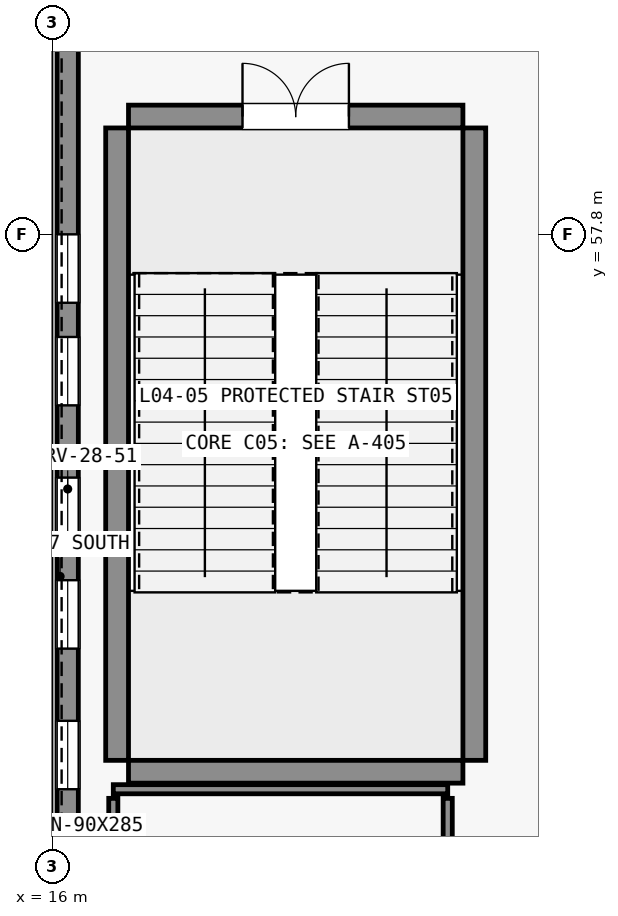
"""IFC4 building model, lengths in metres.
Left out: names, types, materials, properties, quantities, classifications, styles, units other than length and angle.
Written with IfcOpenShell. Run it as: python <this file> out.ifc"""

import sys

from ifc_helpers import new_model, si_unit, direction, frame, frame_2d, origin, place, context, subcontext, project, spatial, rectangle, extrude, element, fill, save


model = new_model("IFC4")
c1 = context("Model", 3, precision=1e-05, world=origin(), true_north=direction((0.0, 1.0)))
c2 = subcontext(c1, "Body", "Model", "MODEL_VIEW")
j1 = project(units=[si_unit("LENGTHUNIT", "METRE"), si_unit("PLANEANGLEUNIT", "RADIAN")], contexts=[c1])
p1 = place(None, origin())
s1 = spatial("IfcSite", under=j1, at=p1, CompositionType="ELEMENT")
p2 = place(p1, origin())
s2 = spatial("IfcBuilding", under=s1, at=p2, CompositionType="ELEMENT")
p3 = place(p2, frame((0.0, 0.0, 21.0)))
s3 = spatial("IfcBuildingStorey", under=s2, at=p3, CompositionType="ELEMENT", Elevation=21.0)
p4 = place(p3, frame((17.0, 50.73, 0.0), z_axis=(0.0, 0.0, 1.0), x_axis=(1.0, 0.0, 0.0)))
e1 = element("IfcWall", 1, at=p4, inside=s3, PredefinedType="SHEAR", context=c2, shape_type="SweptSolid", body=[
    extrude(rectangle(XDim=4.4, YDim=0.3, at=frame_2d((2.2, 0.0))), origin(), (0.0, 0.0, 1.0), 5.4),
])
p5 = place(p3, frame((17.0, 59.35, 0.0), z_axis=(0.0, 0.0, 1.0), x_axis=(1.0, 0.0, 0.0)))
e2 = element("IfcWall", 2, at=p5, inside=s3, PredefinedType="SHEAR", context=c2, shape_type="SweptSolid", body=[
    extrude(rectangle(XDim=4.4, YDim=0.3, at=frame_2d((2.2, 0.0))), origin(), (0.0, 0.0, 1.0), 5.4),
])
p6 = place(p5, frame((1.5, 0.0, 0.0)))
e3 = element("IfcOpeningElement", 3, at=p6, cuts=e2, PredefinedType="OPENING", context=c2, shape_type="SweptSolid", body=[
    extrude(rectangle(XDim=1.4, YDim=2.2, at=frame_2d((0.7, 1.1))), frame((0.0, 0.16, 0.0), z_axis=(0.0, -1.0, 0.0), x_axis=(1.0, 0.0, 0.0)), (0.0, 0.0, 1.0), 0.32),
])
for number, where, z_axis, x_axis in (
    (4, (16.85, 50.88, 0.0), (0.0, 0.0, 1.0), (0.0, 1.0, 0.0)),
    (5, (21.55, 50.88, 0.0), (0.0, 0.0, 1.0), (0.0, 1.0, 0.0)),
):
    element("IfcWall", number, at=place(p3, frame(where, z_axis=z_axis, x_axis=x_axis)), inside=s3, PredefinedType="SHEAR", context=c2, shape_type="SweptSolid", body=[
        extrude(rectangle(XDim=8.32, YDim=0.3, at=frame_2d((4.16, 0.0))), origin(), (0.0, 0.0, 1.0), 5.4),
    ])
p7 = place(p3, frame((16.2, 48.05, 0.0), z_axis=(0.0, 0.0, 1.0), x_axis=(0.0, 1.0, 0.0)))
e6 = element("IfcWall", 6, at=p7, inside=s3, PredefinedType="STANDARD", context=c2, shape_type="SweptSolid", body=[
    extrude(rectangle(XDim=12.8, YDim=0.28, at=frame_2d((6.4, 0.0))), origin(), (0.0, 0.0, 1.0), 5.06),
])
p8 = place(p7, frame((1.1, 0.0, 0.95)))
e7 = element("IfcOpeningElement", 7, at=p8, cuts=e6, PredefinedType="OPENING", context=c2, shape_type="SweptSolid", body=[
    extrude(rectangle(XDim=0.9, YDim=2.85, at=frame_2d((0.45, 1.425))), frame((0.0, 0.15, 0.0), z_axis=(0.0, -1.0, 0.0), x_axis=(1.0, 0.0, 0.0)), (0.0, 0.0, 1.0), 0.3),
])
p9 = place(p7, frame((2.45, 0.0, 0.95)))
e8 = element("IfcOpeningElement", 8, at=p9, cuts=e6, PredefinedType="OPENING", context=c2, shape_type="SweptSolid", body=[
    extrude(rectangle(XDim=0.9, YDim=2.85, at=frame_2d((0.45, 1.425))), frame((0.0, 0.15, 0.0), z_axis=(0.0, -1.0, 0.0), x_axis=(1.0, 0.0, 0.0)), (0.0, 0.0, 1.0), 0.3),
])
p10 = place(p7, frame((4.3, 0.0, 0.95)))
e9 = element("IfcOpeningElement", 9, at=p10, cuts=e6, PredefinedType="OPENING", context=c2, shape_type="SweptSolid", body=[
    extrude(rectangle(XDim=0.9, YDim=2.85, at=frame_2d((0.45, 1.425))), frame((0.0, 0.15, 0.0), z_axis=(0.0, -1.0, 0.0), x_axis=(1.0, 0.0, 0.0)), (0.0, 0.0, 1.0), 0.3),
])
p11 = place(p7, frame((5.65, 0.0, 0.95)))
e10 = element("IfcOpeningElement", 10, at=p11, cuts=e6, PredefinedType="OPENING", context=c2, shape_type="SweptSolid", body=[
    extrude(rectangle(XDim=0.9, YDim=2.85, at=frame_2d((0.45, 1.425))), frame((0.0, 0.15, 0.0), z_axis=(0.0, -1.0, 0.0), x_axis=(1.0, 0.0, 0.0)), (0.0, 0.0, 1.0), 0.3),
])
p12 = place(p7, frame((7.5, 0.0, 0.95)))
e11 = element("IfcOpeningElement", 11, at=p12, cuts=e6, PredefinedType="OPENING", context=c2, shape_type="SweptSolid", body=[
    extrude(rectangle(XDim=0.9, YDim=2.85, at=frame_2d((0.45, 1.425))), frame((0.0, 0.15, 0.0), z_axis=(0.0, -1.0, 0.0), x_axis=(1.0, 0.0, 0.0)), (0.0, 0.0, 1.0), 0.3),
])
p13 = place(p7, frame((8.85, 0.0, 0.95)))
e12 = element("IfcOpeningElement", 12, at=p13, cuts=e6, PredefinedType="OPENING", context=c2, shape_type="SweptSolid", body=[
    extrude(rectangle(XDim=0.9, YDim=2.85, at=frame_2d((0.45, 1.425))), frame((0.0, 0.15, 0.0), z_axis=(0.0, -1.0, 0.0), x_axis=(1.0, 0.0, 0.0)), (0.0, 0.0, 1.0), 0.3),
])
p14 = place(p3, frame((16.8, 50.5, 0.0), z_axis=(0.0, 0.0, 1.0), x_axis=(1.0, 0.0, 0.0)))
e13 = element("IfcWall", 13, at=p14, inside=s3, PredefinedType="PARTITIONING", context=c2, shape_type="SweptSolid", body=[
    extrude(rectangle(XDim=4.4, YDim=0.12, at=frame_2d((2.2, 0.0))), origin(), (0.0, 0.0, 1.0), 5.06),
])
p15 = place(p3, frame((16.8, 42.62, 0.0), z_axis=(0.0, 0.0, 1.0), x_axis=(0.0, 1.0, 0.0)))
e14 = element("IfcWall", 14, at=p15, inside=s3, PredefinedType="PARTITIONING", context=c2, shape_type="SweptSolid", body=[
    extrude(rectangle(XDim=7.76, YDim=0.12, at=frame_2d((3.88, 0.0))), origin(), (0.0, 0.0, 1.0), 5.06),
])
p16 = place(p3, frame((21.2, 42.62, 0.0), z_axis=(0.0, 0.0, 1.0), x_axis=(0.0, 1.0, 0.0)))
e15 = element("IfcWall", 15, at=p16, inside=s3, PredefinedType="PARTITIONING", context=c2, shape_type="SweptSolid", body=[
    extrude(rectangle(XDim=7.76, YDim=0.12, at=frame_2d((3.88, 0.0))), origin(), (0.0, 0.0, 1.0), 5.06),
])
p17 = place(p16, frame((3.33, 0.0, 0.0)))
e16 = element("IfcOpeningElement", 16, at=p17, cuts=e15, PredefinedType="OPENING", context=c2, shape_type="SweptSolid", body=[
    extrude(rectangle(XDim=1.1, YDim=2.2, at=frame_2d((0.55, 1.1))), frame((0.0, 0.07, 0.0), z_axis=(0.0, -1.0, 0.0), x_axis=(1.0, 0.0, 0.0)), (0.0, 0.0, 1.0), 0.14),
])
p18 = place(p8, origin())
e17 = element("IfcWindow", 17, at=p18, inside=s3, PartitioningType="DOUBLE_PANEL_VERTICAL", PredefinedType="WINDOW", context=c2, shape_type="SweptSolid", body=[
    extrude(rectangle(XDim=0.9, YDim=2.85, at=frame_2d((0.45, 1.425))), frame((0.0, 0.03, 0.0), z_axis=(0.0, -1.0, 0.0), x_axis=(1.0, 0.0, 0.0)), (0.0, 0.0, 1.0), 0.06),
])
fill(e7, e17)
p19 = place(p9, origin())
e18 = element("IfcWindow", 18, at=p19, inside=s3, PartitioningType="DOUBLE_PANEL_VERTICAL", PredefinedType="WINDOW", context=c2, shape_type="SweptSolid", body=[
    extrude(rectangle(XDim=0.9, YDim=2.85, at=frame_2d((0.45, 1.425))), frame((0.0, 0.03, 0.0), z_axis=(0.0, -1.0, 0.0), x_axis=(1.0, 0.0, 0.0)), (0.0, 0.0, 1.0), 0.06),
])
fill(e8, e18)
p20 = place(p10, origin())
e19 = element("IfcWindow", 19, at=p20, inside=s3, PartitioningType="DOUBLE_PANEL_VERTICAL", PredefinedType="WINDOW", context=c2, shape_type="SweptSolid", body=[
    extrude(rectangle(XDim=0.9, YDim=2.85, at=frame_2d((0.45, 1.425))), frame((0.0, 0.03, 0.0), z_axis=(0.0, -1.0, 0.0), x_axis=(1.0, 0.0, 0.0)), (0.0, 0.0, 1.0), 0.06),
])
fill(e9, e19)
p21 = place(p11, origin())
e20 = element("IfcWindow", 20, at=p21, inside=s3, PartitioningType="DOUBLE_PANEL_VERTICAL", PredefinedType="WINDOW", context=c2, shape_type="SweptSolid", body=[
    extrude(rectangle(XDim=0.9, YDim=2.85, at=frame_2d((0.45, 1.425))), frame((0.0, 0.03, 0.0), z_axis=(0.0, -1.0, 0.0), x_axis=(1.0, 0.0, 0.0)), (0.0, 0.0, 1.0), 0.06),
])
fill(e10, e20)
p22 = place(p12, origin())
e21 = element("IfcWindow", 21, at=p22, inside=s3, PartitioningType="DOUBLE_PANEL_VERTICAL", PredefinedType="WINDOW", context=c2, shape_type="SweptSolid", body=[
    extrude(rectangle(XDim=0.9, YDim=2.85, at=frame_2d((0.45, 1.425))), frame((0.0, 0.03, 0.0), z_axis=(0.0, -1.0, 0.0), x_axis=(1.0, 0.0, 0.0)), (0.0, 0.0, 1.0), 0.06),
])
fill(e11, e21)
p23 = place(p13, origin())
e22 = element("IfcWindow", 22, at=p23, inside=s3, PartitioningType="DOUBLE_PANEL_VERTICAL", PredefinedType="WINDOW", context=c2, shape_type="SweptSolid", body=[
    extrude(rectangle(XDim=0.9, YDim=2.85, at=frame_2d((0.45, 1.425))), frame((0.0, 0.03, 0.0), z_axis=(0.0, -1.0, 0.0), x_axis=(1.0, 0.0, 0.0)), (0.0, 0.0, 1.0), 0.06),
])
fill(e12, e22)
p24 = place(p6, origin())
e23 = element("IfcDoor", 23, at=p24, inside=s3, OperationType="DOUBLE_DOOR_SINGLE_SWING", PredefinedType="DOOR", context=c2, shape_type="SweptSolid", body=[
    extrude(rectangle(XDim=1.4, YDim=2.2, at=frame_2d((0.7, 1.1))), frame((0.0, 0.025, 0.0), z_axis=(0.0, -1.0, 0.0), x_axis=(1.0, 0.0, 0.0)), (0.0, 0.0, 1.0), 0.05),
])
fill(e3, e23)
save(model, sys.argv[1])
